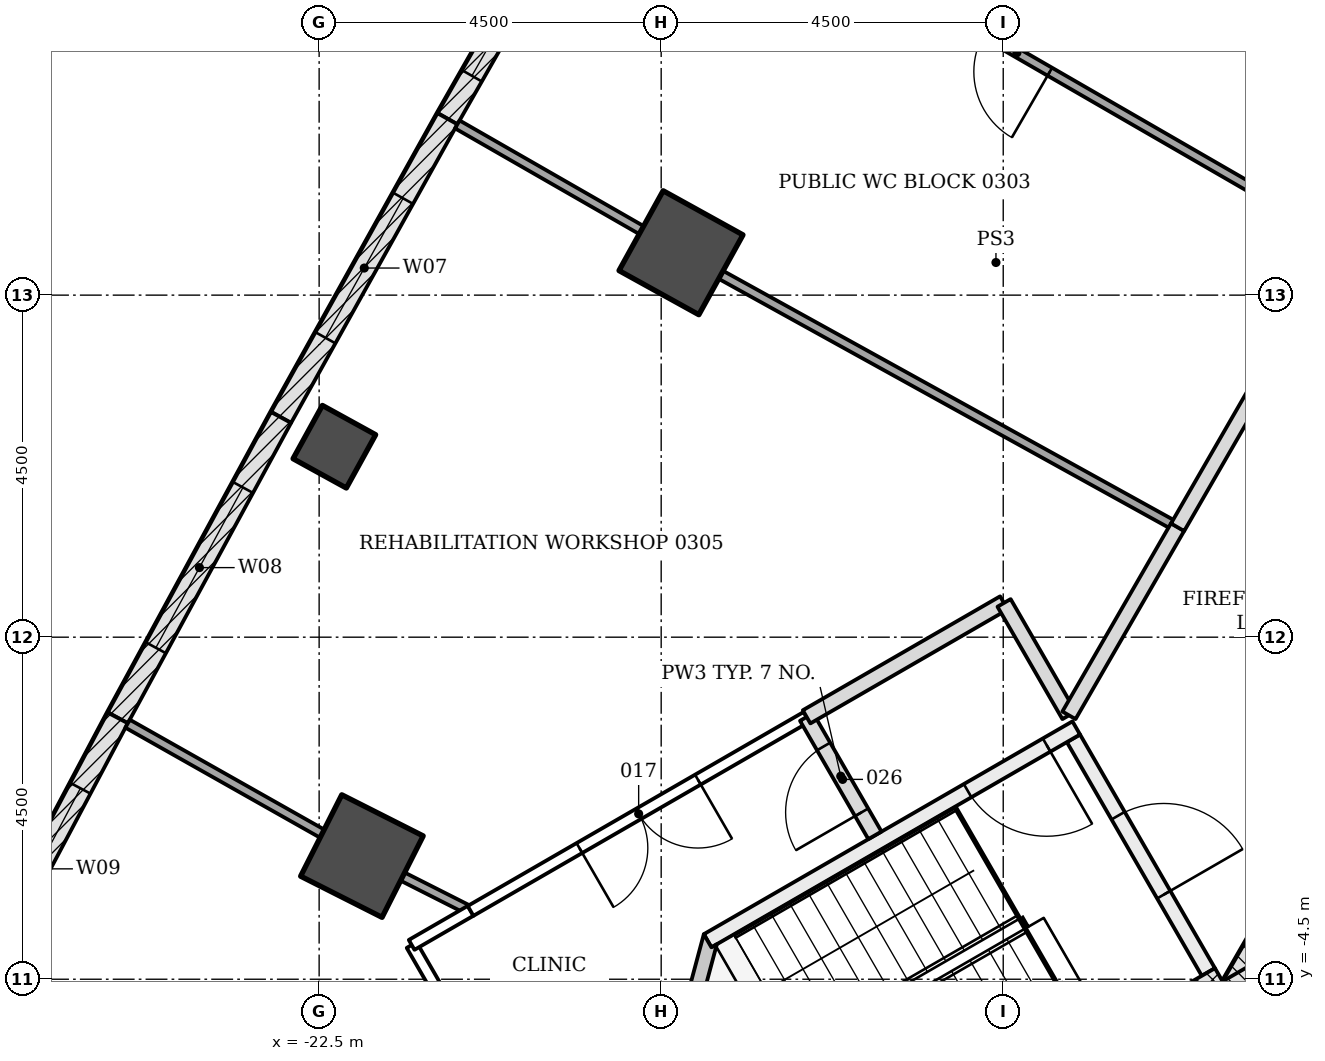
"""IFC4 building model, lengths in metres.
Left out: names, types, materials, properties, quantities, classifications, styles, units other than length and angle.
Written with IfcOpenShell. Run it as: python <this file> out.ifc"""

import sys

from ifc_helpers import new_model, si_unit, direction, frame, frame_2d, origin, origin_2d, place, context, subcontext, project, spatial, polyline, rectangle, outline, extrude, element, fill, save


model = new_model("IFC4")
c1 = context("Model", 3, precision=1e-05, world=origin(), true_north=direction((0.0, 1.0)))
c2 = subcontext(c1, "Body", "Model", "MODEL_VIEW")
j1 = project(units=[si_unit("LENGTHUNIT", "METRE"), si_unit("PLANEANGLEUNIT", "RADIAN")], contexts=[c1])
p1 = place(None, origin())
s1 = spatial("IfcSite", under=j1, at=p1, CompositionType="ELEMENT")
p2 = place(p1, origin())
s2 = spatial("IfcBuilding", under=s1, at=p2, CompositionType="ELEMENT")
p3 = place(p2, frame((0.0, 0.0, 15.0)))
s3 = spatial("IfcBuildingStorey", under=s2, at=p3, CompositionType="ELEMENT", Elevation=15.0)
for number, where, z_axis, x_axis in (
    (1, (-17.739, 5.058, -0.25), (0.0, 0.0, 1.0), (-0.875, 0.484, 0.0)),
    (2, (-21.937, -2.88, -0.25), (0.0, 0.0, 1.0), (-0.893, 0.451, 0.0)),
):
    element("IfcColumn", number, at=place(p3, frame(where, z_axis=z_axis, x_axis=x_axis)), inside=s3, PredefinedType="COLUMN", context=c2, shape_type="SweptSolid", body=[
        extrude(rectangle(XDim=1.2, YDim=1.2, at=origin_2d()), origin(), (0.0, 0.0, 1.0), 4.5),
    ])
p4 = place(p3, frame((-22.3, 2.506, -0.25), z_axis=(0.0, 0.0, 1.0), x_axis=(-0.87611131274, 0.482108875348, 0.0)))
e3 = element("IfcColumn", 3, at=p4, inside=s3, PredefinedType="COLUMN", context=c2, shape_type="SweptSolid", body=[
    extrude(rectangle(XDim=0.8, YDim=0.8, at=origin_2d()), origin(), (0.0, 0.0, 1.0), 4.5),
])
p5 = place(p3, frame((-1.083, 11.281, -0.25), z_axis=(0.0, 0.0, 1.0), x_axis=(-0.500001446645, -0.866024568562, 0.0)))
e4 = element("IfcWall", 4, at=p5, inside=s3, PredefinedType="SHEAR", context=c2, shape_type="SweptSolid", body=[
    extrude(rectangle(XDim=18.458, YDim=0.7, at=frame_2d((9.229, 0.0))), origin(), (0.0, 0.0, 1.0), 4.5),
])
p6 = place(p5, frame((8.979, 0.0, 0.25)))
e5 = element("IfcOpeningElement", 5, at=p6, cuts=e4, PredefinedType="OPENING", context=c2, shape_type="SweptSolid", body=[
    extrude(rectangle(XDim=1.2, YDim=2.1, at=frame_2d((0.6, 1.05))), frame((0.0, 0.36, 0.0), z_axis=(0.0, -1.0, 0.0), x_axis=(1.0, 0.0, 0.0)), (0.0, 0.0, 1.0), 0.72),
])
p7 = place(p5, frame((11.029, 0.0, 0.25)))
e6 = element("IfcOpeningElement", 6, at=p7, cuts=e4, PredefinedType="OPENING", context=c2, shape_type="SweptSolid", body=[
    extrude(rectangle(XDim=1.2, YDim=2.1, at=frame_2d((0.6, 1.05))), frame((0.0, 0.36, 0.0), z_axis=(0.0, -1.0, 0.0), x_axis=(1.0, 0.0, 0.0)), (0.0, 0.0, 1.0), 0.72),
])
p8 = place(p3, frame((-10.311, -4.353, -0.25), z_axis=(0.0, 0.0, 1.0), x_axis=(0.500042739161, -0.866000726912, 0.0)))
e7 = element("IfcWall", 7, at=p8, inside=s3, PredefinedType="SHEAR", context=c2, shape_type="SweptSolid", body=[
    extrude(rectangle(XDim=2.771, YDim=0.7, at=frame_2d((1.386, 0.0))), origin(), (0.0, 0.0, 1.0), 4.5),
])
p9 = place(p3, frame((-20.811, 6.823, 0.0), z_axis=(0.0, 0.0, 1.0), x_axis=(0.495524760411, 0.868593812907, 0.0)))
e8 = element("IfcWall", 8, at=p9, inside=s3, PredefinedType="NOTDEFINED", context=c2, shape_type="SweptSolid", body=[
    extrude(rectangle(XDim=4.496, YDim=0.3, at=frame_2d((2.248, 0.0))), origin(), (0.0, 0.0, 1.0), 4.25),
])
p10 = place(p9, frame((0.648, 0.0, 0.8)))
e9 = element("IfcOpeningElement", 9, at=p10, cuts=e8, PredefinedType="OPENING", context=c2, shape_type="SweptSolid", body=[
    extrude(rectangle(XDim=3.2, YDim=2.7, at=frame_2d((1.6, 1.35))), frame((0.0, 0.16, 0.0), z_axis=(0.0, -1.0, 0.0), x_axis=(1.0, 0.0, 0.0)), (0.0, 0.0, 1.0), 0.32),
])
p11 = place(p3, frame((-23.0, 2.893, 0.0), z_axis=(0.0, 0.0, 1.0), x_axis=(0.486606252415, 0.873621402617, 0.0)))
e10 = element("IfcWall", 10, at=p11, inside=s3, PredefinedType="NOTDEFINED", context=c2, shape_type="SweptSolid", body=[
    extrude(rectangle(XDim=4.496, YDim=0.3, at=frame_2d((2.248, 0.0))), origin(), (0.0, 0.0, 1.0), 4.25),
])
p12 = place(p11, frame((1.198, 0.0, 0.8)))
e11 = element("IfcOpeningElement", 11, at=p12, cuts=e10, PredefinedType="OPENING", context=c2, shape_type="SweptSolid", body=[
    extrude(rectangle(XDim=2.1, YDim=3.0, at=frame_2d((1.05, 1.5))), frame((0.0, 0.16, 0.0), z_axis=(0.0, -1.0, 0.0), x_axis=(1.0, 0.0, 0.0)), (0.0, 0.0, 1.0), 0.32),
])
p13 = place(p3, frame((-25.148, -1.06, 0.0), z_axis=(0.0, 0.0, 1.0), x_axis=(0.477577109439, 0.878589838628, 0.0)))
e12 = element("IfcWall", 12, at=p13, inside=s3, PredefinedType="NOTDEFINED", context=c2, shape_type="SweptSolid", body=[
    extrude(rectangle(XDim=4.496, YDim=0.3, at=frame_2d((2.248, 0.0))), origin(), (0.0, 0.0, 1.0), 4.25),
])
p14 = place(p13, frame((1.048, 0.0, 0.9)))
e13 = element("IfcOpeningElement", 13, at=p14, cuts=e12, PredefinedType="OPENING", context=c2, shape_type="SweptSolid", body=[
    extrude(rectangle(XDim=2.4, YDim=2.4, at=frame_2d((1.2, 1.2))), frame((0.0, 0.16, 0.0), z_axis=(0.0, -1.0, 0.0), x_axis=(1.0, 0.0, 0.0)), (0.0, 0.0, 1.0), 0.32),
])
p15 = place(p3, frame((-27.256, -5.034, 0.0), z_axis=(0.0, 0.0, 1.0), x_axis=(0.468566202388, 0.883428386447, 0.0)))
e14 = element("IfcWall", 14, at=p15, inside=s3, PredefinedType="NOTDEFINED", context=c2, shape_type="SweptSolid", body=[
    extrude(rectangle(XDim=4.496, YDim=0.3, at=frame_2d((2.248, 0.0))), origin(), (0.0, 0.0, 1.0), 4.25),
])
p16 = place(p15, frame((1.048, 0.0, 0.9)))
e15 = element("IfcOpeningElement", 15, at=p16, cuts=e14, PredefinedType="OPENING", context=c2, shape_type="SweptSolid", body=[
    extrude(rectangle(XDim=2.4, YDim=2.4, at=frame_2d((1.2, 1.2))), frame((0.0, 0.16, 0.0), z_axis=(0.0, -1.0, 0.0), x_axis=(1.0, 0.0, 0.0)), (0.0, 0.0, 1.0), 0.32),
])
p17 = place(p3, frame((-12.576, -1.331, -0.25), z_axis=(0.0, 0.0, 1.0), x_axis=(0.499970499736, -0.8660424351, 0.0)))
e16 = element("IfcWall", 16, at=p17, inside=s3, PredefinedType="SHEAR", context=c2, shape_type="SweptSolid", body=[
    extrude(rectangle(XDim=3.55, YDim=0.2, at=frame_2d((1.775, 0.0))), origin(), (0.0, 0.0, 1.0), 4.5),
])
p18 = place(p17, frame((1.175, 0.0, 0.25)))
e17 = element("IfcOpeningElement", 17, at=p18, cuts=e16, PredefinedType="OPENING", context=c2, shape_type="SweptSolid", body=[
    extrude(rectangle(XDim=1.2, YDim=2.1, at=frame_2d((0.6, 1.05))), frame((0.0, 0.11, 0.0), z_axis=(0.0, -1.0, 0.0), x_axis=(1.0, 0.0, 0.0)), (0.0, 0.0, 1.0), 0.22),
])
p19 = place(p3, frame((-12.539, -1.194, -0.25), z_axis=(0.0, 0.0, 1.0), x_axis=(-0.866045472092, -0.499965239061, 0.0)))
e18 = element("IfcWall", 18, at=p19, inside=s3, PredefinedType="SHEAR", context=c2, shape_type="SweptSolid", body=[
    extrude(rectangle(XDim=5.6, YDim=0.2, at=frame_2d((2.8, 0.0))), origin(), (0.0, 0.0, 1.0), 4.5),
])
p20 = place(p19, frame((0.45, 0.0, 0.25)))
e19 = element("IfcOpeningElement", 19, at=p20, cuts=e18, PredefinedType="OPENING", context=c2, shape_type="SweptSolid", body=[
    extrude(rectangle(XDim=1.2, YDim=2.1, at=frame_2d((0.6, 1.05))), frame((0.0, 0.11, 0.0), z_axis=(0.0, -1.0, 0.0), x_axis=(1.0, 0.0, 0.0)), (0.0, 0.0, 1.0), 0.22),
])
p21 = place(p3, frame((-10.43, -4.847, -0.25), z_axis=(0.0, 0.0, 1.0), x_axis=(-0.866018442252, -0.500012057535, 0.0)))
e20 = element("IfcWall", 20, at=p21, inside=s3, PredefinedType="SHEAR", context=c2, shape_type="SweptSolid", body=[
    extrude(rectangle(XDim=7.2, YDim=1.136, at=frame_2d((3.6, 0.0))), origin(), (0.0, 0.0, 1.0), 4.5),
])
p22 = place(p3, frame((0.0, 0.0, -0.25)))
e21 = element("IfcWall", 21, at=p22, inside=s3, PredefinedType="SHEAR", context=c2, shape_type="SweptSolid", body=[
    extrude(outline(polyline([(-17.439, -3.907), (-18.025, -6.093), (-16.95, -7.955), (-16.777, -7.855), (-17.81, -6.065), (-17.267, -4.039), (-17.339, -4.081), (-17.339, -4.081), (-17.339, -4.081), (-17.339, -4.081), (-17.339, -4.081), (-17.339, -4.081), (-17.339, -4.081), (-17.339, -4.081), (-17.339, -4.081), (-17.339, -4.081), (-17.339, -4.081), (-17.339, -4.081), (-17.339, -4.081), (-17.339, -4.081), (-17.339, -4.081), (-17.339, -4.081), (-17.339, -4.081), (-17.439, -3.907)])), origin(), (0.0, 0.0, 1.0), 4.5),
])
p23 = place(p3, frame((-17.941, -9.838, 0.0), z_axis=(0.0, 0.0, 1.0), x_axis=(-0.500048140185, 0.865997608252, 0.0)))
e22 = element("IfcWall", 22, at=p23, inside=s3, PredefinedType="PARTITIONING", context=c2, shape_type="SweptSolid", body=[
    extrude(rectangle(XDim=6.683, YDim=0.15, at=frame_2d((3.342, 0.0))), origin(), (0.0, 0.0, 1.0), 3.638),
])
p24 = place(p23, frame((2.45, 0.0, 0.0)))
e23 = element("IfcOpeningElement", 23, at=p24, cuts=e22, PredefinedType="OPENING", context=c2, shape_type="SweptSolid", body=[
    extrude(rectangle(XDim=1.8, YDim=2.1, at=frame_2d((0.9, 1.05))), frame((0.0, 0.085, 0.0), z_axis=(0.0, -1.0, 0.0), x_axis=(1.0, 0.0, 0.0)), (0.0, 0.0, 1.0), 0.17),
])
p25 = place(p3, frame((-21.283, -4.048, 0.0), z_axis=(0.0, 0.0, 1.0), x_axis=(0.865804825377, 0.500381858538, 0.0)))
e24 = element("IfcWall", 24, at=p25, inside=s3, PredefinedType="PARTITIONING", context=c2, shape_type="SweptSolid", body=[
    extrude(rectangle(XDim=0.897, YDim=0.15, at=frame_2d((0.449, 0.0))), origin(), (0.0, 0.0, 1.0), 3.638),
])
p26 = place(p3, frame((-22.461, -2.584, 0.0), z_axis=(0.0, 0.0, 1.0), x_axis=(-0.870620069476, 0.491955988505, 0.0)))
e25 = element("IfcWall", 25, at=p26, inside=s3, PredefinedType="PARTITIONING", context=c2, shape_type="SweptSolid", body=[
    extrude(rectangle(XDim=2.939, YDim=0.12, at=frame_2d((1.47, 0.0))), origin(), (0.0, 0.0, 1.0), 3.633),
])
p27 = place(p3, frame((-20.509, -3.601, 0.0), z_axis=(0.0, 0.0, 1.0), x_axis=(-0.892316605155, 0.451410097544, 0.0)))
e26 = element("IfcWall", 26, at=p27, inside=s3, PredefinedType="PARTITIONING", context=c2, shape_type="SweptSolid", body=[
    extrude(rectangle(XDim=1.0, YDim=0.12, at=frame_2d((0.5, 0.0))), origin(), (0.0, 0.0, 1.0), 3.638),
])
p28 = place(p3, frame((-16.088, -1.049, 0.0), z_axis=(0.0, 0.0, 1.0), x_axis=(-0.866023883975, -0.500002632377, 0.0)))
e27 = element("IfcWall", 27, at=p28, inside=s3, PredefinedType="PARTITIONING", context=c2, shape_type="SweptSolid", body=[
    extrude(rectangle(XDim=5.104, YDim=0.15, at=frame_2d((2.552, 0.0))), origin(), (0.0, 0.0, 1.0), 3.638),
])
p29 = place(p28, frame((1.65, 0.0, 0.0)))
e28 = element("IfcOpeningElement", 28, at=p29, cuts=e27, PredefinedType="OPENING", context=c2, shape_type="SweptSolid", body=[
    extrude(rectangle(XDim=1.8, YDim=2.1, at=frame_2d((0.9, 1.05))), frame((0.0, 0.085, 0.0), z_axis=(0.0, -1.0, 0.0), x_axis=(1.0, 0.0, 0.0)), (0.0, 0.0, 1.0), 0.17),
])
p30 = place(p3, frame((-15.188, -2.607, 0.0), z_axis=(0.0, 0.0, 1.0), x_axis=(-0.500024172624, 0.866011447264, 0.0)))
e29 = element("IfcWall", 29, at=p30, inside=s3, PredefinedType="PARTITIONING", context=c2, shape_type="SweptSolid", body=[
    extrude(rectangle(XDim=1.798, YDim=0.2, at=frame_2d((0.899, 0.0))), origin(), (0.0, 0.0, 1.0), 3.638),
])
p31 = place(p30, frame((0.35, 0.0, 0.0)))
e30 = element("IfcOpeningElement", 30, at=p31, cuts=e29, PredefinedType="OPENING", context=c2, shape_type="SweptSolid", body=[
    extrude(rectangle(XDim=1.0, YDim=2.1, at=frame_2d((0.5, 1.05))), frame((0.0, 0.11, 0.0), z_axis=(0.0, -1.0, 0.0), x_axis=(1.0, 0.0, 0.0)), (0.0, 0.0, 1.0), 0.22),
])
p32 = place(p3, frame((-16.087, -1.048, 0.0), z_axis=(0.0, 0.0, 1.0), x_axis=(0.865988915629, 0.500063194015, 0.0)))
e31 = element("IfcWall", 31, at=p32, inside=s3, PredefinedType="PARTITIONING", context=c2, shape_type="SweptSolid", body=[
    extrude(rectangle(XDim=2.998, YDim=0.2, at=frame_2d((1.499, 0.0))), origin(), (0.0, 0.0, 1.0), 3.638),
])
p33 = place(p3, frame((-13.489, 0.451, 0.0), z_axis=(0.0, 0.0, 1.0), x_axis=(0.500044178772, -0.865999895656, 0.0)))
e32 = element("IfcWall", 32, at=p33, inside=s3, PredefinedType="PARTITIONING", context=c2, shape_type="SweptSolid", body=[
    extrude(rectangle(XDim=1.708, YDim=0.2, at=frame_2d((0.854, 0.0))), origin(), (0.0, 0.0, 1.0), 4.25),
])
p34 = place(p3, frame((-12.635, -1.028, 0.0), z_axis=(0.0, 0.0, 1.0), x_axis=(0.499801250411, 0.866140121509, 0.0)))
e33 = element("IfcWall", 33, at=p34, inside=s3, PredefinedType="PARTITIONING", context=c2, shape_type="SweptSolid", body=[
    extrude(rectangle(XDim=2.861, YDim=0.2, at=frame_2d((1.431, 0.0))), origin(), (0.0, 0.0, 1.0), 3.638),
])
p35 = place(p3, frame((-18.26, 5.356, 0.0), z_axis=(0.0, 0.0, 1.0), x_axis=(-0.867283853893, 0.49781393791, 0.0)))
e34 = element("IfcWall", 34, at=p35, inside=s3, PredefinedType="PARTITIONING", context=c2, shape_type="SweptSolid", body=[
    extrude(rectangle(XDim=2.792, YDim=0.12, at=frame_2d((1.396, 0.0))), origin(), (0.0, 0.0, 1.0), 3.633),
])
p36 = place(p3, frame((-11.208, 1.446, 0.0), z_axis=(0.0, 0.0, 1.0), x_axis=(-0.875125393946, 0.483896212912, 0.0)))
e35 = element("IfcWall", 35, at=p36, inside=s3, PredefinedType="PARTITIONING", context=c2, shape_type="SweptSolid", body=[
    extrude(rectangle(XDim=6.863, YDim=0.12, at=frame_2d((3.432, 0.0))), origin(), (0.0, 0.0, 1.0), 3.638),
])
p37 = place(p3, frame((-9.032, 5.213, 0.0), z_axis=(0.0, 0.0, 1.0), x_axis=(-0.499876332206, -0.866096791646, 0.0)))
e36 = element("IfcWall", 36, at=p37, inside=s3, PredefinedType="PARTITIONING", context=c2, shape_type="SweptSolid", body=[
    extrude(rectangle(XDim=4.349, YDim=0.2, at=frame_2d((2.175, 0.0))), origin(), (0.0, 0.0, 1.0), 3.638),
])
p38 = place(p3, frame((-9.033, 5.214, 0.0), z_axis=(0.0, 0.0, 1.0), x_axis=(-0.866000641544, 0.500042887006, 0.0)))
e37 = element("IfcWall", 37, at=p38, inside=s3, PredefinedType="PARTITIONING", context=c2, shape_type="SweptSolid", body=[
    extrude(rectangle(XDim=9.827, YDim=0.12, at=frame_2d((4.914, 0.0))), origin(), (0.0, 0.0, 1.0), 3.638),
])
p39 = place(p38, frame((4.45, 0.0, 0.0)))
e38 = element("IfcOpeningElement", 38, at=p39, cuts=e37, PredefinedType="OPENING", context=c2, shape_type="SweptSolid", body=[
    extrude(rectangle(XDim=1.0, YDim=2.1, at=frame_2d((0.5, 1.05))), frame((0.0, 0.07, 0.0), z_axis=(0.0, -1.0, 0.0), x_axis=(1.0, 0.0, 0.0)), (0.0, 0.0, 1.0), 0.14),
])
p40 = place(p10, origin())
e39 = element("IfcWindow", 39, at=p40, inside=s3, PartitioningType="TRIPLE_PANEL_VERTICAL", PredefinedType="WINDOW", context=c2, shape_type="SweptSolid", body=[
    extrude(rectangle(XDim=3.2, YDim=2.7, at=frame_2d((1.6, 1.35))), frame((0.0, 0.03, 0.0), z_axis=(0.0, -1.0, 0.0), x_axis=(1.0, 0.0, 0.0)), (0.0, 0.0, 1.0), 0.06),
])
fill(e9, e39)
p41 = place(p12, origin())
e40 = element("IfcWindow", 40, at=p41, inside=s3, PartitioningType="DOUBLE_PANEL_HORIZONTAL", PredefinedType="WINDOW", context=c2, shape_type="SweptSolid", body=[
    extrude(rectangle(XDim=2.1, YDim=3.0, at=frame_2d((1.05, 1.5))), frame((0.0, 0.03, 0.0), z_axis=(0.0, -1.0, 0.0), x_axis=(1.0, 0.0, 0.0)), (0.0, 0.0, 1.0), 0.06),
])
fill(e11, e40)
p42 = place(p14, origin())
e41 = element("IfcWindow", 41, at=p42, inside=s3, PartitioningType="DOUBLE_PANEL_VERTICAL", PredefinedType="WINDOW", context=c2, shape_type="SweptSolid", body=[
    extrude(rectangle(XDim=2.4, YDim=2.4, at=frame_2d((1.2, 1.2))), frame((0.0, 0.03, 0.0), z_axis=(0.0, -1.0, 0.0), x_axis=(1.0, 0.0, 0.0)), (0.0, 0.0, 1.0), 0.06),
])
fill(e13, e41)
p43 = place(p16, origin())
e42 = element("IfcWindow", 42, at=p43, inside=s3, PartitioningType="DOUBLE_PANEL_VERTICAL", PredefinedType="WINDOW", context=c2, shape_type="SweptSolid", body=[
    extrude(rectangle(XDim=2.4, YDim=2.4, at=frame_2d((1.2, 1.2))), frame((0.0, 0.03, 0.0), z_axis=(0.0, -1.0, 0.0), x_axis=(1.0, 0.0, 0.0)), (0.0, 0.0, 1.0), 0.06),
])
fill(e15, e42)
p44 = place(p18, origin())
e43 = element("IfcDoor", 43, at=p44, inside=s3, OperationType="SINGLE_SWING_RIGHT", PredefinedType="DOOR", context=c2, shape_type="SweptSolid", body=[
    extrude(rectangle(XDim=1.2, YDim=2.1, at=frame_2d((0.6, 1.05))), frame((0.0, 0.025, 0.0), z_axis=(0.0, -1.0, 0.0), x_axis=(1.0, 0.0, 0.0)), (0.0, 0.0, 1.0), 0.05),
])
fill(e17, e43)
p45 = place(p20, origin())
e44 = element("IfcDoor", 44, at=p45, inside=s3, OperationType="SINGLE_SWING_LEFT", PredefinedType="DOOR", context=c2, shape_type="SweptSolid", body=[
    extrude(rectangle(XDim=1.2, YDim=2.1, at=frame_2d((0.6, 1.05))), frame((0.0, 0.025, 0.0), z_axis=(0.0, -1.0, 0.0), x_axis=(1.0, 0.0, 0.0)), (0.0, 0.0, 1.0), 0.05),
])
fill(e19, e44)
p46 = place(p29, origin())
e45 = element("IfcDoor", 45, at=p46, inside=s3, OperationType="DOUBLE_DOOR_SINGLE_SWING", PredefinedType="DOOR", context=c2, shape_type="SweptSolid", body=[
    extrude(rectangle(XDim=1.8, YDim=2.1, at=frame_2d((0.9, 1.05))), frame((0.0, 0.025, 0.0), z_axis=(0.0, -1.0, 0.0), x_axis=(1.0, 0.0, 0.0)), (0.0, 0.0, 1.0), 0.05),
])
fill(e28, e45)
p47 = place(p39, origin())
e46 = element("IfcDoor", 46, at=p47, inside=s3, OperationType="SINGLE_SWING_RIGHT", PredefinedType="DOOR", context=c2, shape_type="SweptSolid", body=[
    extrude(rectangle(XDim=1.0, YDim=2.1, at=frame_2d((0.5, 1.05))), frame((0.0, 0.025, 0.0), z_axis=(0.0, -1.0, 0.0), x_axis=(1.0, 0.0, 0.0)), (0.0, 0.0, 1.0), 0.05),
])
fill(e38, e46)
p48 = place(p31, origin())
e47 = element("IfcDoor", 47, at=p48, inside=s3, OperationType="SINGLE_SWING_LEFT", PredefinedType="DOOR", context=c2, shape_type="SweptSolid", body=[
    extrude(rectangle(XDim=1.0, YDim=2.1, at=frame_2d((0.5, 1.05))), frame((0.0, 0.025, 0.0), z_axis=(0.0, -1.0, 0.0), x_axis=(1.0, 0.0, 0.0)), (0.0, 0.0, 1.0), 0.05),
])
fill(e30, e47)
save(model, sys.argv[1])
